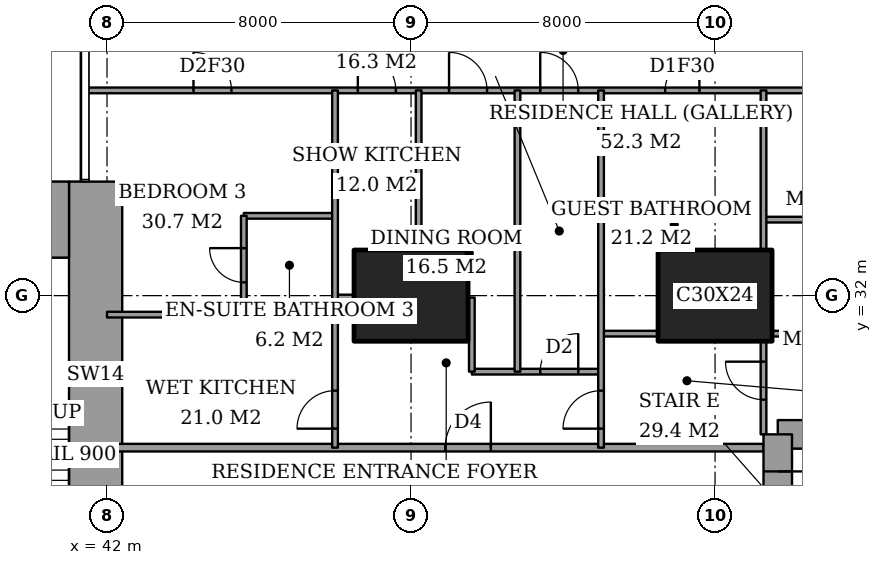
"""IFC4 building model, lengths in metres.
Left out: names, types, materials, properties, quantities, classifications, styles, units other than length and angle.
Written with IfcOpenShell. Run it as: python <this file> out.ifc"""

import sys

from ifc_helpers import new_model, si_unit, direction, frame, frame_2d, origin, origin_2d, place, context, subcontext, project, spatial, rectangle, extrude, element, fill, save


model = new_model("IFC4")
c1 = context("Model", 3, precision=1e-05, world=origin(), true_north=direction((0.0, 1.0)))
c2 = subcontext(c1, "Body", "Model", "MODEL_VIEW")
j1 = project(units=[si_unit("LENGTHUNIT", "METRE"), si_unit("PLANEANGLEUNIT", "RADIAN")], contexts=[c1])
p1 = place(None, origin())
s1 = spatial("IfcSite", under=j1, at=p1, CompositionType="ELEMENT")
p2 = place(p1, origin())
s2 = spatial("IfcBuilding", under=s1, at=p2, CompositionType="ELEMENT")
p3 = place(p2, frame((0.0, 0.0, 103.4)))
s3 = spatial("IfcBuildingStorey", under=s2, at=p3, CompositionType="ELEMENT", Elevation=103.4)
for number, where, z_axis, x_axis in (
    (1, (50.0, 32.0, 0.0), (0.0, 0.0, 1.0), (1.0, 0.0, 0.0)),
    (2, (58.0, 32.0, 0.0), (0.0, 0.0, 1.0), (1.0, 0.0, 0.0)),
):
    element("IfcColumn", number, at=place(p3, frame(where, z_axis=z_axis, x_axis=x_axis)), inside=s3, PredefinedType="COLUMN", context=c2, shape_type="SweptSolid", body=[
        extrude(rectangle(XDim=3.0, YDim=2.4, at=origin_2d()), origin(), (0.0, 0.0, 1.0), 3.6),
    ])
p4 = place(p3, frame((37.85, 34.0, 0.0), z_axis=(0.0, 0.0, 1.0), x_axis=(1.0, 0.0, 0.0)))
e3 = element("IfcWall", 3, at=p4, inside=s3, PredefinedType="SHEAR", context=c2, shape_type="SweptSolid", body=[
    extrude(rectangle(XDim=3.15, YDim=2.0, at=frame_2d((1.575, 0.0))), origin(), (0.0, 0.0, 1.0), 3.6),
])
p5 = place(p3, frame((41.7, 24.85, 0.0), z_axis=(0.0, 0.0, 1.0), x_axis=(0.0, 1.0, 0.0)))
e4 = element("IfcWall", 4, at=p5, inside=s3, PredefinedType="SHEAR", context=c2, shape_type="SweptSolid", body=[
    extrude(rectangle(XDim=10.15, YDim=1.4, at=frame_2d((5.075, 0.0))), origin(), (0.0, 0.0, 1.0), 3.6),
])
p6 = place(p3, frame((64.1, 28.35, 0.0), z_axis=(0.0, 0.0, 1.0), x_axis=(-1.0, 0.0, 0.0)))
e5 = element("IfcWall", 5, at=p6, inside=s3, PredefinedType="SHEAR", context=c2, shape_type="SweptSolid", body=[
    extrude(rectangle(XDim=4.45, YDim=0.75, at=frame_2d((2.225, 0.0))), origin(), (0.0, 0.0, 1.0), 3.6),
])
p7 = place(p3, frame((59.65, 28.35, 0.0), z_axis=(0.0, 0.0, 1.0), x_axis=(0.0, -1.0, 0.0)))
e6 = element("IfcWall", 6, at=p7, inside=s3, PredefinedType="SHEAR", context=c2, shape_type="SweptSolid", body=[
    extrude(rectangle(XDim=8.7, YDim=0.75, at=frame_2d((4.35, 0.0))), origin(), (0.0, 0.0, 1.0), 3.6),
])
p8 = place(p7, frame((0.975, 0.0, 0.0)))
e7 = element("IfcOpeningElement", 7, at=p8, cuts=e6, PredefinedType="OPENING", context=c2, shape_type="SweptSolid", body=[
    extrude(rectangle(XDim=1.0, YDim=2.1, at=frame_2d((0.5, 1.05))), frame((0.0, 0.385, 0.0), z_axis=(0.0, -1.0, 0.0), x_axis=(1.0, 0.0, 0.0)), (0.0, 0.0, 1.0), 0.77),
])
p9 = place(p3, frame((42.0, 28.0, 0.0), z_axis=(0.0, 0.0, 1.0), x_axis=(1.0, 0.0, 0.0)))
e8 = element("IfcWall", 8, at=p9, inside=s3, PredefinedType="PARTITIONING", context=c2, shape_type="SweptSolid", body=[
    extrude(rectangle(XDim=17.275, YDim=0.2, at=frame_2d((8.637, 0.0))), origin(), (0.0, 0.0, 1.0), 3.35),
])
p10 = place(p9, frame((8.9, 0.0, 0.0)))
e9 = element("IfcOpeningElement", 9, at=p10, cuts=e8, PredefinedType="OPENING", context=c2, shape_type="SweptSolid", body=[
    extrude(rectangle(XDim=1.2, YDim=2.4, at=frame_2d((0.6, 1.2))), frame((0.0, 0.11, 0.0), z_axis=(0.0, -1.0, 0.0), x_axis=(1.0, 0.0, 0.0)), (0.0, 0.0, 1.0), 0.22),
])
p11 = place(p3, frame((51.6, 30.0, 0.0), z_axis=(0.0, 0.0, 1.0), x_axis=(1.0, 0.0, 0.0)))
e10 = element("IfcWall", 10, at=p11, inside=s3, PredefinedType="PARTITIONING", context=c2, shape_type="SweptSolid", body=[
    extrude(rectangle(XDim=3.4, YDim=0.15, at=frame_2d((1.7, 0.0))), origin(), (0.0, 0.0, 1.0), 3.35),
])
p12 = place(p11, frame((1.8, 0.0, 0.0)))
e11 = element("IfcOpeningElement", 11, at=p12, cuts=e10, PredefinedType="OPENING", context=c2, shape_type="SweptSolid", body=[
    extrude(rectangle(XDim=1.0, YDim=2.1, at=frame_2d((0.5, 1.05))), frame((0.0, 0.085, 0.0), z_axis=(0.0, -1.0, 0.0), x_axis=(1.0, 0.0, 0.0)), (0.0, 0.0, 1.0), 0.17),
])
p13 = place(p3, frame((55.0, 31.0, 0.0), z_axis=(0.0, 0.0, 1.0), x_axis=(1.0, 0.0, 0.0)))
e12 = element("IfcWall", 12, at=p13, inside=s3, PredefinedType="PARTITIONING", context=c2, shape_type="SweptSolid", body=[
    extrude(rectangle(XDim=1.5, YDim=0.15, at=frame_2d((0.75, 0.0))), origin(), (0.0, 0.0, 1.0), 3.35),
])
p14 = place(p3, frame((59.5, 31.0, 0.0), z_axis=(0.0, 0.0, 1.0), x_axis=(1.0, 0.0, 0.0)))
e13 = element("IfcWall", 13, at=p14, inside=s3, PredefinedType="PARTITIONING", context=c2, shape_type="SweptSolid", body=[
    extrude(rectangle(XDim=5.15, YDim=0.15, at=frame_2d((2.575, 0.0))), origin(), (0.0, 0.0, 1.0), 3.35),
])
p15 = place(p3, frame((42.0, 31.5, 0.0), z_axis=(0.0, 0.0, 1.0), x_axis=(1.0, 0.0, 0.0)))
e14 = element("IfcWall", 14, at=p15, inside=s3, PredefinedType="PARTITIONING", context=c2, shape_type="SweptSolid", body=[
    extrude(rectangle(XDim=6.0, YDim=0.15, at=frame_2d((3.0, 0.0))), origin(), (0.0, 0.0, 1.0), 3.35),
])
p16 = place(p3, frame((48.0, 31.95, 0.0), z_axis=(0.0, 0.0, 1.0), x_axis=(1.0, 0.0, 0.0)))
e15 = element("IfcWall", 15, at=p16, inside=s3, PredefinedType="PARTITIONING", context=c2, shape_type="SweptSolid", body=[
    extrude(rectangle(XDim=0.5, YDim=0.15, at=frame_2d((0.25, 0.0))), origin(), (0.0, 0.0, 1.0), 2.634),
])
p17 = place(p3, frame((59.275, 34.0, 0.0), z_axis=(0.0, 0.0, 1.0), x_axis=(1.0, 0.0, 0.0)))
e16 = element("IfcWall", 16, at=p17, inside=s3, PredefinedType="PARTITIONING", context=c2, shape_type="SweptSolid", body=[
    extrude(rectangle(XDim=2.6, YDim=0.15, at=frame_2d((1.3, 0.0))), origin(), (0.0, 0.0, 1.0), 3.35),
])
p18 = place(p3, frame((45.6, 34.1, 0.0), z_axis=(0.0, 0.0, 1.0), x_axis=(1.0, 0.0, 0.0)))
e17 = element("IfcWall", 17, at=p18, inside=s3, PredefinedType="PARTITIONING", context=c2, shape_type="SweptSolid", body=[
    extrude(rectangle(XDim=2.4, YDim=0.15, at=frame_2d((1.2, 0.0))), origin(), (0.0, 0.0, 1.0), 3.35),
])
p19 = place(p3, frame((41.439, 37.4, 0.0), z_axis=(0.0, 0.0, 1.0), x_axis=(1.0, 0.0, 0.0)))
e18 = element("IfcWall", 18, at=p19, inside=s3, PredefinedType="PARTITIONING", context=c2, shape_type="SweptSolid", body=[
    extrude(rectangle(XDim=25.011, YDim=0.15, at=frame_2d((12.505, 0.0))), origin(), (0.0, 0.0, 1.0), 3.35),
])
p20 = place(p19, frame((11.961, 0.0, 0.0)))
e19 = element("IfcOpeningElement", 19, at=p20, cuts=e18, PredefinedType="OPENING", context=c2, shape_type="SweptSolid", body=[
    extrude(rectangle(XDim=1.0, YDim=2.1, at=frame_2d((0.5, 1.05))), frame((0.0, 0.085, 0.0), z_axis=(0.0, -1.0, 0.0), x_axis=(1.0, 0.0, 0.0)), (0.0, 0.0, 1.0), 0.17),
])
p21 = place(p19, frame((20.924, 0.0, 0.0)))
e20 = element("IfcOpeningElement", 20, at=p21, cuts=e18, PredefinedType="OPENING", context=c2, shape_type="SweptSolid", body=[
    extrude(rectangle(XDim=1.0, YDim=2.1, at=frame_2d((0.5, 1.05))), frame((0.0, 0.085, 0.0), z_axis=(0.0, -1.0, 0.0), x_axis=(1.0, 0.0, 0.0)), (0.0, 0.0, 1.0), 0.17),
])
p22 = place(p19, frame((15.249, 0.0, 0.0)))
e21 = element("IfcOpeningElement", 21, at=p22, cuts=e18, PredefinedType="OPENING", context=c2, shape_type="SweptSolid", body=[
    extrude(rectangle(XDim=0.9, YDim=2.1, at=frame_2d((0.45, 1.05))), frame((0.0, 0.085, 0.0), z_axis=(0.0, -1.0, 0.0), x_axis=(1.0, 0.0, 0.0)), (0.0, 0.0, 1.0), 0.17),
])
p23 = place(p19, frame((9.561, 0.0, 0.0)))
e22 = element("IfcOpeningElement", 22, at=p23, cuts=e18, PredefinedType="OPENING", context=c2, shape_type="SweptSolid", body=[
    extrude(rectangle(XDim=1.0, YDim=2.1, at=frame_2d((0.5, 1.05))), frame((0.0, 0.085, 0.0), z_axis=(0.0, -1.0, 0.0), x_axis=(1.0, 0.0, 0.0)), (0.0, 0.0, 1.0), 0.17),
])
p24 = place(p19, frame((7.161, 0.0, 0.0)))
e23 = element("IfcOpeningElement", 23, at=p24, cuts=e18, PredefinedType="OPENING", context=c2, shape_type="SweptSolid", body=[
    extrude(rectangle(XDim=1.0, YDim=2.1, at=frame_2d((0.5, 1.05))), frame((0.0, 0.085, 0.0), z_axis=(0.0, -1.0, 0.0), x_axis=(1.0, 0.0, 0.0)), (0.0, 0.0, 1.0), 0.17),
])
p25 = place(p19, frame((2.836, 0.0, 0.0)))
e24 = element("IfcOpeningElement", 24, at=p25, cuts=e18, PredefinedType="OPENING", context=c2, shape_type="SweptSolid", body=[
    extrude(rectangle(XDim=1.0, YDim=2.1, at=frame_2d((0.5, 1.05))), frame((0.0, 0.085, 0.0), z_axis=(0.0, -1.0, 0.0), x_axis=(1.0, 0.0, 0.0)), (0.0, 0.0, 1.0), 0.17),
])
p26 = place(p3, frame((45.6, 31.5, 0.0), z_axis=(0.0, 0.0, 1.0), x_axis=(0.0, 1.0, 0.0)))
e25 = element("IfcWall", 25, at=p26, inside=s3, PredefinedType="PARTITIONING", context=c2, shape_type="SweptSolid", body=[
    extrude(rectangle(XDim=2.6, YDim=0.15, at=frame_2d((1.3, 0.0))), origin(), (0.0, 0.0, 1.0), 3.35),
])
p27 = place(p26, frame((0.85, 0.0, 0.0)))
e26 = element("IfcOpeningElement", 26, at=p27, cuts=e25, PredefinedType="OPENING", context=c2, shape_type="SweptSolid", body=[
    extrude(rectangle(XDim=0.9, YDim=2.1, at=frame_2d((0.45, 1.05))), frame((0.0, 0.085, 0.0), z_axis=(0.0, -1.0, 0.0), x_axis=(1.0, 0.0, 0.0)), (0.0, 0.0, 1.0), 0.17),
])
p28 = place(p3, frame((48.0, 28.0, 0.0), z_axis=(0.0, 0.0, 1.0), x_axis=(0.0, 1.0, 0.0)))
e27 = element("IfcWall", 27, at=p28, inside=s3, PredefinedType="PARTITIONING", context=c2, shape_type="SweptSolid", body=[
    extrude(rectangle(XDim=9.4, YDim=0.15, at=frame_2d((4.7, 0.0))), origin(), (0.0, 0.0, 1.0), 3.35),
])
p29 = place(p28, frame((0.5, 0.0, 0.0)))
e28 = element("IfcOpeningElement", 28, at=p29, cuts=e27, PredefinedType="OPENING", context=c2, shape_type="SweptSolid", body=[
    extrude(rectangle(XDim=1.0, YDim=2.1, at=frame_2d((0.5, 1.05))), frame((0.0, 0.085, 0.0), z_axis=(0.0, -1.0, 0.0), x_axis=(1.0, 0.0, 0.0)), (0.0, 0.0, 1.0), 0.17),
])
p30 = place(p3, frame((50.2, 33.2, 0.0), z_axis=(0.0, 0.0, 1.0), x_axis=(0.0, 1.0, 0.0)))
e29 = element("IfcWall", 29, at=p30, inside=s3, PredefinedType="PARTITIONING", context=c2, shape_type="SweptSolid", body=[
    extrude(rectangle(XDim=4.2, YDim=0.15, at=frame_2d((2.1, 0.0))), origin(), (0.0, 0.0, 1.0), 3.35),
])
p31 = place(p3, frame((51.6, 30.0, 0.0), z_axis=(0.0, 0.0, 1.0), x_axis=(0.0, 1.0, 0.0)))
e30 = element("IfcWall", 30, at=p31, inside=s3, PredefinedType="PARTITIONING", context=c2, shape_type="SweptSolid", body=[
    extrude(rectangle(XDim=1.95, YDim=0.15, at=frame_2d((0.975, 0.0))), origin(), (0.0, 0.0, 1.0), 3.35),
])
p32 = place(p3, frame((52.8, 30.0, 0.0), z_axis=(0.0, 0.0, 1.0), x_axis=(0.0, 1.0, 0.0)))
e31 = element("IfcWall", 31, at=p32, inside=s3, PredefinedType="PARTITIONING", context=c2, shape_type="SweptSolid", body=[
    extrude(rectangle(XDim=7.4, YDim=0.15, at=frame_2d((3.7, 0.0))), origin(), (0.0, 0.0, 1.0), 3.35),
])
p33 = place(p3, frame((55.0, 28.0, 0.0), z_axis=(0.0, 0.0, 1.0), x_axis=(0.0, 1.0, 0.0)))
e32 = element("IfcWall", 32, at=p33, inside=s3, PredefinedType="PARTITIONING", context=c2, shape_type="SweptSolid", body=[
    extrude(rectangle(XDim=9.4, YDim=0.15, at=frame_2d((4.7, 0.0))), origin(), (0.0, 0.0, 1.0), 3.35),
])
p34 = place(p33, frame((0.5, 0.0, 0.0)))
e33 = element("IfcOpeningElement", 33, at=p34, cuts=e32, PredefinedType="OPENING", context=c2, shape_type="SweptSolid", body=[
    extrude(rectangle(XDim=1.0, YDim=2.1, at=frame_2d((0.5, 1.05))), frame((0.0, 0.085, 0.0), z_axis=(0.0, -1.0, 0.0), x_axis=(1.0, 0.0, 0.0)), (0.0, 0.0, 1.0), 0.17),
])
p35 = place(p3, frame((59.275, 28.35, 0.0), z_axis=(0.0, 0.0, 1.0), x_axis=(0.0, 1.0, 0.0)))
e34 = element("IfcWall", 34, at=p35, inside=s3, PredefinedType="PARTITIONING", context=c2, shape_type="SweptSolid", body=[
    extrude(rectangle(XDim=2.45, YDim=0.15, at=frame_2d((1.225, 0.0))), origin(), (0.0, 0.0, 1.0), 3.35),
])
p36 = place(p35, frame((0.913, 0.0, 0.0)))
e35 = element("IfcOpeningElement", 35, at=p36, cuts=e34, PredefinedType="OPENING", context=c2, shape_type="SweptSolid", body=[
    extrude(rectangle(XDim=1.0, YDim=2.1, at=frame_2d((0.5, 1.05))), frame((0.0, 0.085, 0.0), z_axis=(0.0, -1.0, 0.0), x_axis=(1.0, 0.0, 0.0)), (0.0, 0.0, 1.0), 0.17),
])
p37 = place(p3, frame((59.275, 33.2, 0.0), z_axis=(0.0, 0.0, 1.0), x_axis=(0.0, 1.0, 0.0)))
e36 = element("IfcWall", 36, at=p37, inside=s3, PredefinedType="PARTITIONING", context=c2, shape_type="SweptSolid", body=[
    extrude(rectangle(XDim=4.2, YDim=0.15, at=frame_2d((2.1, 0.0))), origin(), (0.0, 0.0, 1.0), 3.35),
])
p38 = place(p20, origin())
e37 = element("IfcDoor", 37, at=p38, inside=s3, OperationType="SINGLE_SWING_RIGHT", PredefinedType="DOOR", context=c2, shape_type="SweptSolid", body=[
    extrude(rectangle(XDim=1.0, YDim=2.1, at=frame_2d((0.5, 1.05))), frame((0.0, 0.025, 0.0), z_axis=(0.0, -1.0, 0.0), x_axis=(1.0, 0.0, 0.0)), (0.0, 0.0, 1.0), 0.05),
])
fill(e19, e37)
p39 = place(p36, origin())
e38 = element("IfcDoor", 38, at=p39, inside=s3, OperationType="SINGLE_SWING_LEFT", PredefinedType="DOOR", context=c2, shape_type="SweptSolid", body=[
    extrude(rectangle(XDim=1.0, YDim=2.1, at=frame_2d((0.5, 1.05))), frame((0.0, 0.025, 0.0), z_axis=(0.0, -1.0, 0.0), x_axis=(1.0, 0.0, 0.0)), (0.0, 0.0, 1.0), 0.05),
])
fill(e35, e38)
p40 = place(p22, origin())
e39 = element("IfcDoor", 39, at=p40, inside=s3, OperationType="SINGLE_SWING_LEFT", PredefinedType="DOOR", context=c2, shape_type="SweptSolid", body=[
    extrude(rectangle(XDim=0.9, YDim=2.1, at=frame_2d((0.45, 1.05))), frame((0.0, 0.025, 0.0), z_axis=(0.0, -1.0, 0.0), x_axis=(1.0, 0.0, 0.0)), (0.0, 0.0, 1.0), 0.05),
])
fill(e21, e39)
p41 = place(p34, origin())
e40 = element("IfcDoor", 40, at=p41, inside=s3, OperationType="SINGLE_SWING_RIGHT", PredefinedType="DOOR", context=c2, shape_type="SweptSolid", body=[
    extrude(rectangle(XDim=1.0, YDim=2.1, at=frame_2d((0.5, 1.05))), frame((0.0, 0.025, 0.0), z_axis=(0.0, -1.0, 0.0), x_axis=(1.0, 0.0, 0.0)), (0.0, 0.0, 1.0), 0.05),
])
fill(e33, e40)
p42 = place(p10, origin())
e41 = element("IfcDoor", 41, at=p42, inside=s3, OperationType="SINGLE_SWING_LEFT", PredefinedType="DOOR", context=c2, shape_type="SweptSolid", body=[
    extrude(rectangle(XDim=1.2, YDim=2.4, at=frame_2d((0.6, 1.2))), frame((0.0, 0.025, 0.0), z_axis=(0.0, -1.0, 0.0), x_axis=(1.0, 0.0, 0.0)), (0.0, 0.0, 1.0), 0.05),
])
fill(e9, e41)
p43 = place(p12, origin())
e42 = element("IfcDoor", 42, at=p43, inside=s3, OperationType="SINGLE_SWING_LEFT", PredefinedType="DOOR", context=c2, shape_type="SweptSolid", body=[
    extrude(rectangle(XDim=1.0, YDim=2.1, at=frame_2d((0.5, 1.05))), frame((0.0, 0.025, 0.0), z_axis=(0.0, -1.0, 0.0), x_axis=(1.0, 0.0, 0.0)), (0.0, 0.0, 1.0), 0.05),
])
fill(e11, e42)
p44 = place(p23, origin())
e43 = element("IfcDoor", 43, at=p44, inside=s3, OperationType="SINGLE_SWING_RIGHT", PredefinedType="DOOR", context=c2, shape_type="SweptSolid", body=[
    extrude(rectangle(XDim=1.0, YDim=2.1, at=frame_2d((0.5, 1.05))), frame((0.0, 0.025, 0.0), z_axis=(0.0, -1.0, 0.0), x_axis=(1.0, 0.0, 0.0)), (0.0, 0.0, 1.0), 0.05),
])
fill(e22, e43)
p45 = place(p24, origin())
e44 = element("IfcDoor", 44, at=p45, inside=s3, OperationType="SINGLE_SWING_RIGHT", PredefinedType="DOOR", context=c2, shape_type="SweptSolid", body=[
    extrude(rectangle(XDim=1.0, YDim=2.1, at=frame_2d((0.5, 1.05))), frame((0.0, 0.025, 0.0), z_axis=(0.0, -1.0, 0.0), x_axis=(1.0, 0.0, 0.0)), (0.0, 0.0, 1.0), 0.05),
])
fill(e23, e44)
p46 = place(p27, origin())
e45 = element("IfcDoor", 45, at=p46, inside=s3, OperationType="SINGLE_SWING_LEFT", PredefinedType="DOOR", context=c2, shape_type="SweptSolid", body=[
    extrude(rectangle(XDim=0.9, YDim=2.1, at=frame_2d((0.45, 1.05))), frame((0.0, 0.025, 0.0), z_axis=(0.0, -1.0, 0.0), x_axis=(1.0, 0.0, 0.0)), (0.0, 0.0, 1.0), 0.05),
])
fill(e26, e45)
p47 = place(p25, origin())
e46 = element("IfcDoor", 46, at=p47, inside=s3, OperationType="SINGLE_SWING_RIGHT", PredefinedType="DOOR", context=c2, shape_type="SweptSolid", body=[
    extrude(rectangle(XDim=1.0, YDim=2.1, at=frame_2d((0.5, 1.05))), frame((0.0, 0.025, 0.0), z_axis=(0.0, -1.0, 0.0), x_axis=(1.0, 0.0, 0.0)), (0.0, 0.0, 1.0), 0.05),
])
fill(e24, e46)
p48 = place(p29, origin())
e47 = element("IfcDoor", 47, at=p48, inside=s3, OperationType="SINGLE_SWING_RIGHT", PredefinedType="DOOR", context=c2, shape_type="SweptSolid", body=[
    extrude(rectangle(XDim=1.0, YDim=2.1, at=frame_2d((0.5, 1.05))), frame((0.0, 0.025, 0.0), z_axis=(0.0, -1.0, 0.0), x_axis=(1.0, 0.0, 0.0)), (0.0, 0.0, 1.0), 0.05),
])
fill(e28, e47)
p49 = place(p8, origin())
e48 = element("IfcDoor", 48, at=p49, inside=s3, OperationType="SINGLE_SWING_RIGHT", PredefinedType="DOOR", context=c2, shape_type="SweptSolid", body=[
    extrude(rectangle(XDim=1.0, YDim=2.1, at=frame_2d((0.5, 1.05))), frame((0.0, 0.025, 0.0), z_axis=(0.0, -1.0, 0.0), x_axis=(1.0, 0.0, 0.0)), (0.0, 0.0, 1.0), 0.05),
])
fill(e7, e48)
save(model, sys.argv[1])
